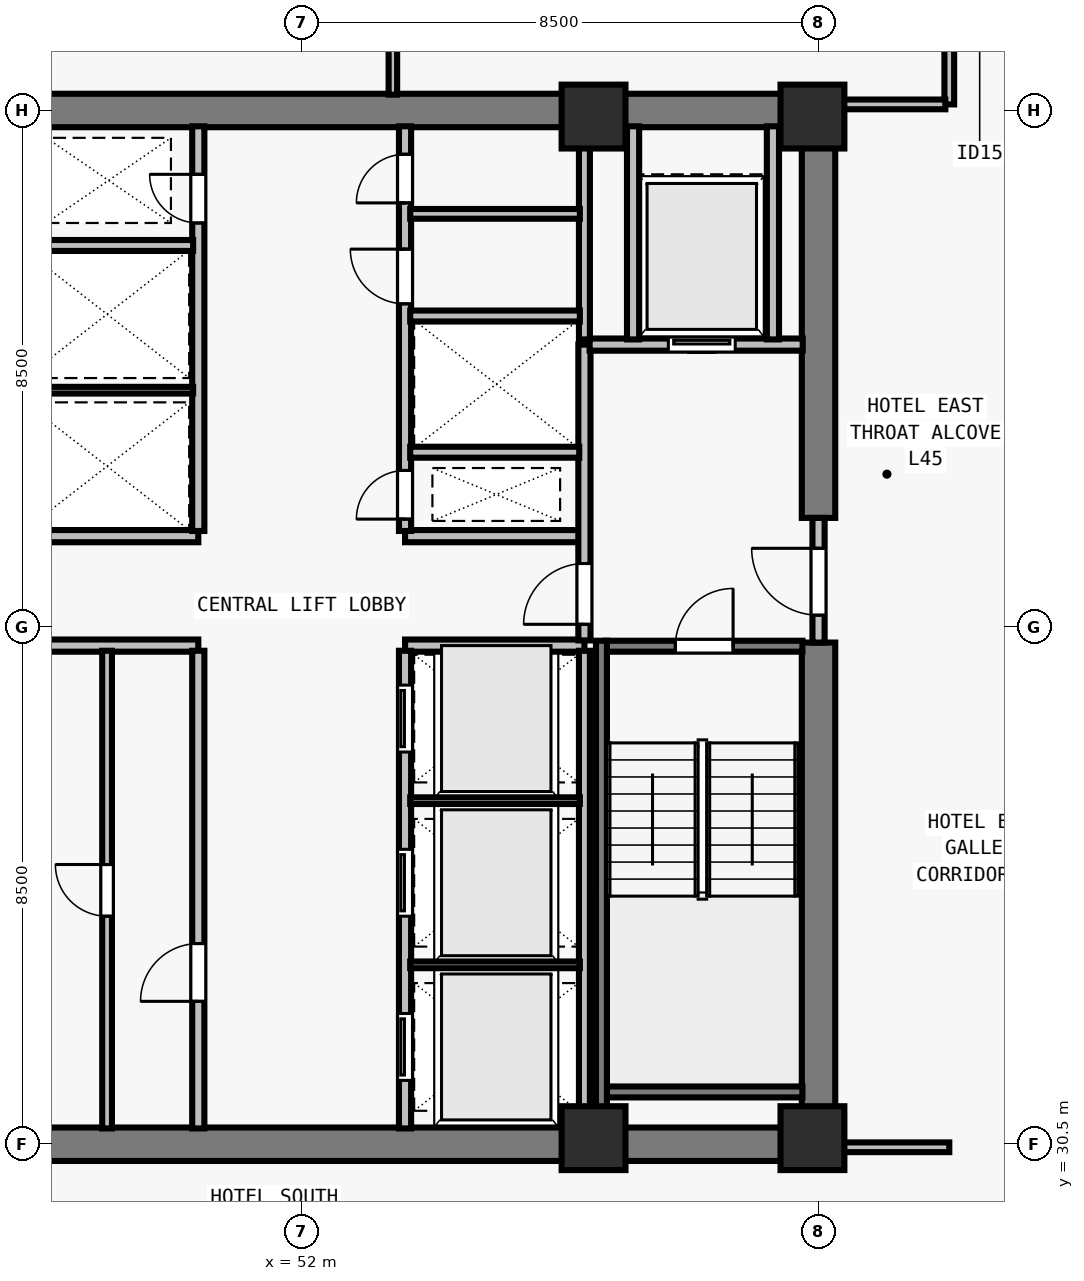
"""IFC4 building model, lengths in metres.
Left out: names, types, materials, properties, quantities, classifications, styles, units other than length and angle.
Written with IfcOpenShell. Run it as: python <this file> out.ifc"""

import sys

from ifc_helpers import new_model, si_unit, direction, frame, frame_2d, origin, origin_2d, place, context, subcontext, project, spatial, rectangle, extrude, element, fill, save


model = new_model("IFC4")
c1 = context("Model", 3, precision=1e-05, world=origin(), true_north=direction((0.0, 1.0)))
c2 = subcontext(c1, "Body", "Model", "MODEL_VIEW")
j1 = project(units=[si_unit("LENGTHUNIT", "METRE"), si_unit("PLANEANGLEUNIT", "RADIAN")], contexts=[c1])
p1 = place(None, origin())
s1 = spatial("IfcSite", under=j1, at=p1, CompositionType="ELEMENT")
p2 = place(p1, origin())
s2 = spatial("IfcBuilding", under=s1, at=p2, CompositionType="ELEMENT")
p3 = place(p2, frame((0.0, 0.0, 165.5)))
s3 = spatial("IfcBuildingStorey", under=s2, at=p3, CompositionType="ELEMENT", Elevation=165.5)
for number, where, z_axis, x_axis in (
    (1, (56.8, 30.6, 0.0), (0.0, 0.0, 1.0), (1.0, 0.0, 0.0)),
    (2, (60.4, 30.6, 0.0), (0.0, 0.0, 1.0), (1.0, 0.0, 0.0)),
    (3, (56.8, 47.4, 0.0), (0.0, 0.0, 1.0), (1.0, 0.0, 0.0)),
    (4, (60.4, 47.4, 0.0), (0.0, 0.0, 1.0), (1.0, 0.0, 0.0)),
):
    element("IfcColumn", number, at=place(p3, frame(where, z_axis=z_axis, x_axis=x_axis)), inside=s3, PredefinedType="COLUMN", context=c2, shape_type="SweptSolid", body=[
        extrude(rectangle(XDim=1.05, YDim=1.05, at=origin_2d()), origin(), (0.0, 0.0, 1.0), 3.5),
    ])
for number, where, z_axis, x_axis in (
    (5, (43.225, 30.5, 0.0), (0.0, 0.0, 1.0), (1.0, 0.0, 0.0)),
    (6, (43.225, 47.5, 0.0), (0.0, 0.0, 1.0), (1.0, 0.0, 0.0)),
):
    element("IfcWall", number, at=place(p3, frame(where, z_axis=z_axis, x_axis=x_axis)), inside=s3, PredefinedType="SHEAR", context=c2, shape_type="SweptSolid", body=[
        extrude(rectangle(XDim=17.55, YDim=0.55, at=frame_2d((8.775, 0.0))), origin(), (0.0, 0.0, 1.0), 3.28),
    ])
p4 = place(p3, frame((60.5, 30.765, 0.0), z_axis=(0.0, 0.0, 1.0), x_axis=(0.0, 1.0, 0.0)))
e7 = element("IfcWall", 7, at=p4, inside=s3, PredefinedType="SHEAR", context=c2, shape_type="SweptSolid", body=[
    extrude(rectangle(XDim=7.985, YDim=0.55, at=frame_2d((3.993, 0.0))), origin(), (0.0, 0.0, 1.0), 3.28),
])
p5 = place(p3, frame((60.5, 40.8, 0.0), z_axis=(0.0, 0.0, 1.0), x_axis=(0.0, 1.0, 0.0)))
e8 = element("IfcWall", 8, at=p5, inside=s3, PredefinedType="SHEAR", context=c2, shape_type="SweptSolid", body=[
    extrude(rectangle(XDim=6.435, YDim=0.55, at=frame_2d((3.218, 0.0))), origin(), (0.0, 0.0, 1.0), 3.28),
])
for number, where, z_axis, x_axis in (
    (9, (47.35, 38.7, 0.0), (0.0, 0.0, 1.0), (1.0, 0.0, 0.0)),
    (10, (47.35, 40.5, 0.0), (0.0, 0.0, 1.0), (1.0, 0.0, 0.0)),
    (11, (53.7, 38.7, 0.0), (0.0, 0.0, 1.0), (1.0, 0.0, 0.0)),
    (12, (53.7, 40.5, 0.0), (0.0, 0.0, 1.0), (1.0, 0.0, 0.0)),
):
    element("IfcWall", number, at=place(p3, frame(where, z_axis=z_axis, x_axis=x_axis)), inside=s3, PredefinedType="SOLIDWALL", context=c2, shape_type="SweptSolid", body=[
        extrude(rectangle(XDim=2.95, YDim=0.2, at=frame_2d((1.475, 0.0))), origin(), (0.0, 0.0, 1.0), 3.28),
    ])
p6 = place(p3, frame((50.3, 30.76, 0.0), z_axis=(0.0, 0.0, 1.0), x_axis=(0.0, 1.0, 0.0)))
e13 = element("IfcWall", 13, at=p6, inside=s3, PredefinedType="SOLIDWALL", context=c2, shape_type="SweptSolid", body=[
    extrude(rectangle(XDim=7.855, YDim=0.2, at=frame_2d((3.927, 0.0))), origin(), (0.0, 0.0, 1.0), 3.28),
])
p7 = place(p6, frame((2.09, 0.0, 0.0)))
e14 = element("IfcOpeningElement", 14, at=p7, cuts=e13, PredefinedType="OPENING", context=c2, shape_type="SweptSolid", body=[
    extrude(rectangle(XDim=0.95, YDim=2.12, at=frame_2d((0.475, 1.06))), frame((0.0, 0.11, 0.0), z_axis=(0.0, -1.0, 0.0), x_axis=(1.0, 0.0, 0.0)), (0.0, 0.0, 1.0), 0.22),
])
p8 = place(p3, frame((53.7, 30.76, 0.0), z_axis=(0.0, 0.0, 1.0), x_axis=(0.0, 1.0, 0.0)))
e15 = element("IfcWall", 15, at=p8, inside=s3, PredefinedType="SOLIDWALL", context=c2, shape_type="SweptSolid", body=[
    extrude(rectangle(XDim=7.855, YDim=0.2, at=frame_2d((3.927, 0.0))), origin(), (0.0, 0.0, 1.0), 3.28),
])
p9 = place(p8, frame((0.79, 0.0, 0.0)))
e16 = element("IfcOpeningElement", 16, at=p9, cuts=e15, PredefinedType="OPENING", context=c2, shape_type="SweptSolid", body=[
    extrude(rectangle(XDim=1.1, YDim=2.2, at=frame_2d((0.55, 1.1))), frame((0.0, 0.11, 0.0), z_axis=(0.0, -1.0, 0.0), x_axis=(1.0, 0.0, 0.0)), (0.0, 0.0, 1.0), 0.22),
])
p10 = place(p8, frame((3.49, 0.0, 0.0)))
e17 = element("IfcOpeningElement", 17, at=p10, cuts=e15, PredefinedType="OPENING", context=c2, shape_type="SweptSolid", body=[
    extrude(rectangle(XDim=1.1, YDim=2.2, at=frame_2d((0.55, 1.1))), frame((0.0, 0.11, 0.0), z_axis=(0.0, -1.0, 0.0), x_axis=(1.0, 0.0, 0.0)), (0.0, 0.0, 1.0), 0.22),
])
p11 = place(p8, frame((6.19, 0.0, 0.0)))
e18 = element("IfcOpeningElement", 18, at=p11, cuts=e15, PredefinedType="OPENING", context=c2, shape_type="SweptSolid", body=[
    extrude(rectangle(XDim=1.1, YDim=2.2, at=frame_2d((0.55, 1.1))), frame((0.0, 0.11, 0.0), z_axis=(0.0, -1.0, 0.0), x_axis=(1.0, 0.0, 0.0)), (0.0, 0.0, 1.0), 0.22),
])
p12 = place(p3, frame((50.3, 40.585, 0.0), z_axis=(0.0, 0.0, 1.0), x_axis=(0.0, 1.0, 0.0)))
e19 = element("IfcWall", 19, at=p12, inside=s3, PredefinedType="SOLIDWALL", context=c2, shape_type="SweptSolid", body=[
    extrude(rectangle(XDim=6.655, YDim=0.2, at=frame_2d((3.328, 0.0))), origin(), (0.0, 0.0, 1.0), 3.28),
])
p13 = place(p12, frame((5.065, 0.0, 0.0)))
e20 = element("IfcOpeningElement", 20, at=p13, cuts=e19, PredefinedType="OPENING", context=c2, shape_type="SweptSolid", body=[
    extrude(rectangle(XDim=0.8, YDim=2.08, at=frame_2d((0.4, 1.04))), frame((0.0, 0.11, 0.0), z_axis=(0.0, -1.0, 0.0), x_axis=(1.0, 0.0, 0.0)), (0.0, 0.0, 1.0), 0.22),
])
p14 = place(p3, frame((53.7, 40.585, 0.0), z_axis=(0.0, 0.0, 1.0), x_axis=(0.0, 1.0, 0.0)))
e21 = element("IfcWall", 21, at=p14, inside=s3, PredefinedType="SOLIDWALL", context=c2, shape_type="SweptSolid", body=[
    extrude(rectangle(XDim=6.655, YDim=0.2, at=frame_2d((3.328, 0.0))), origin(), (0.0, 0.0, 1.0), 3.28),
])
p15 = place(p14, frame((0.195, 0.0, 0.0)))
e22 = element("IfcOpeningElement", 22, at=p15, cuts=e21, PredefinedType="OPENING", context=c2, shape_type="SweptSolid", body=[
    extrude(rectangle(XDim=0.8, YDim=2.08, at=frame_2d((0.4, 1.04))), frame((0.0, 0.11, 0.0), z_axis=(0.0, -1.0, 0.0), x_axis=(1.0, 0.0, 0.0)), (0.0, 0.0, 1.0), 0.22),
])
p16 = place(p14, frame((3.735, 0.0, 0.0)))
e23 = element("IfcOpeningElement", 23, at=p16, cuts=e21, PredefinedType="OPENING", context=c2, shape_type="SweptSolid", body=[
    extrude(rectangle(XDim=0.9, YDim=2.12, at=frame_2d((0.45, 1.06))), frame((0.0, 0.11, 0.0), z_axis=(0.0, -1.0, 0.0), x_axis=(1.0, 0.0, 0.0)), (0.0, 0.0, 1.0), 0.22),
])
p17 = place(p14, frame((5.395, 0.0, 0.0)))
e24 = element("IfcOpeningElement", 24, at=p17, cuts=e21, PredefinedType="OPENING", context=c2, shape_type="SweptSolid", body=[
    extrude(rectangle(XDim=0.8, YDim=2.1, at=frame_2d((0.4, 1.05))), frame((0.0, 0.11, 0.0), z_axis=(0.0, -1.0, 0.0), x_axis=(1.0, 0.0, 0.0)), (0.0, 0.0, 1.0), 0.22),
])
p18 = place(p3, frame((60.5, 38.75, 0.0), z_axis=(0.0, 0.0, 1.0), x_axis=(0.0, 1.0, 0.0)))
e25 = element("IfcWall", 25, at=p18, inside=s3, PredefinedType="SOLIDWALL", context=c2, shape_type="SweptSolid", body=[
    extrude(rectangle(XDim=2.05, YDim=0.2, at=frame_2d((1.025, 0.0))), origin(), (0.0, 0.0, 1.0), 3.28),
])
p19 = place(p18, frame((0.45, 0.0, 0.0)))
e26 = element("IfcOpeningElement", 26, at=p19, cuts=e25, PredefinedType="OPENING", context=c2, shape_type="SweptSolid", body=[
    extrude(rectangle(XDim=1.1, YDim=2.15, at=frame_2d((0.55, 1.075))), frame((0.0, 0.11, 0.0), z_axis=(0.0, -1.0, 0.0), x_axis=(1.0, 0.0, 0.0)), (0.0, 0.0, 1.0), 0.22),
])
p20 = place(p3, frame((56.65, 38.785, 0.0), z_axis=(0.0, 0.0, 1.0), x_axis=(0.0, 1.0, 0.0)))
e27 = element("IfcWall", 27, at=p20, inside=s3, PredefinedType="SOLIDWALL", context=c2, shape_type="SweptSolid", body=[
    extrude(rectangle(XDim=4.865, YDim=0.2, at=frame_2d((2.433, 0.0))), origin(), (0.0, 0.0, 1.0), 3.28),
])
p21 = place(p20, frame((0.265, 0.0, 0.0)))
e28 = element("IfcOpeningElement", 28, at=p21, cuts=e27, PredefinedType="OPENING", context=c2, shape_type="SweptSolid", body=[
    extrude(rectangle(XDim=1.0, YDim=2.15, at=frame_2d((0.5, 1.075))), frame((0.0, 0.11, 0.0), z_axis=(0.0, -1.0, 0.0), x_axis=(1.0, 0.0, 0.0)), (0.0, 0.0, 1.0), 0.22),
])
p22 = place(p3, frame((56.735, 43.65, 0.0), z_axis=(0.0, 0.0, 1.0), x_axis=(1.0, 0.0, 0.0)))
e29 = element("IfcWall", 29, at=p22, inside=s3, PredefinedType="SOLIDWALL", context=c2, shape_type="SweptSolid", body=[
    extrude(rectangle(XDim=3.505, YDim=0.2, at=frame_2d((1.752, 0.0))), origin(), (0.0, 0.0, 1.0), 3.28),
])
p23 = place(p22, frame((1.295, 0.0, 0.0)))
e30 = element("IfcOpeningElement", 30, at=p23, cuts=e29, PredefinedType="OPENING", context=c2, shape_type="SweptSolid", body=[
    extrude(rectangle(XDim=1.1, YDim=2.2, at=frame_2d((0.55, 1.1))), frame((0.0, 0.11, 0.0), z_axis=(0.0, -1.0, 0.0), x_axis=(1.0, 0.0, 0.0)), (0.0, 0.0, 1.0), 0.22),
])
for number, where, z_axis, x_axis in (
    (31, (57.45, 43.735, 0.0), (0.0, 0.0, 1.0), (0.0, 1.0, 0.0)),
    (32, (59.75, 43.735, 0.0), (0.0, 0.0, 1.0), (0.0, 1.0, 0.0)),
):
    element("IfcWall", number, at=place(p3, frame(where, z_axis=z_axis, x_axis=x_axis)), inside=s3, PredefinedType="SOLIDWALL", context=c2, shape_type="SweptSolid", body=[
        extrude(rectangle(XDim=3.505, YDim=0.2, at=frame_2d((1.752, 0.0))), origin(), (0.0, 0.0, 1.0), 3.28),
    ])
p24 = place(p3, frame((48.8, 30.76, 0.0), z_axis=(0.0, 0.0, 1.0), x_axis=(0.0, 1.0, 0.0)))
e33 = element("IfcWall", 33, at=p24, inside=s3, PredefinedType="PARTITIONING", context=c2, shape_type="SweptSolid", body=[
    extrude(rectangle(XDim=7.855, YDim=0.16, at=frame_2d((3.927, 0.0))), origin(), (0.0, 0.0, 1.0), 3.28),
])
p25 = place(p24, frame((3.49, 0.0, 0.0)))
e34 = element("IfcOpeningElement", 34, at=p25, cuts=e33, PredefinedType="OPENING", context=c2, shape_type="SweptSolid", body=[
    extrude(rectangle(XDim=0.85, YDim=2.12, at=frame_2d((0.425, 1.06))), frame((0.0, 0.09, 0.0), z_axis=(0.0, -1.0, 0.0), x_axis=(1.0, 0.0, 0.0)), (0.0, 0.0, 1.0), 0.18),
])
p26 = place(p3, frame((56.65, 30.76, 0.0), z_axis=(0.0, 0.0, 1.0), x_axis=(0.0, 1.0, 0.0)))
e35 = element("IfcWall", 35, at=p26, inside=s3, PredefinedType="SOLIDWALL", context=c2, shape_type="SweptSolid", body=[
    extrude(rectangle(XDim=7.855, YDim=0.18, at=frame_2d((3.927, 0.0))), origin(), (0.0, 0.0, 1.0), 3.28),
])
for number, where, z_axis, x_axis in (
    (36, (53.785, 33.45, 0.0), (0.0, 0.0, 1.0), (1.0, 0.0, 0.0)),
    (37, (53.785, 36.15, 0.0), (0.0, 0.0, 1.0), (1.0, 0.0, 0.0)),
):
    element("IfcWall", number, at=place(p3, frame(where, z_axis=z_axis, x_axis=x_axis)), inside=s3, PredefinedType="PARTITIONING", context=c2, shape_type="SweptSolid", body=[
        extrude(rectangle(XDim=2.79, YDim=0.11, at=frame_2d((1.395, 0.0))), origin(), (0.0, 0.0, 1.0), 3.28),
    ])
p27 = place(p3, frame((47.435, 42.9, 0.0), z_axis=(0.0, 0.0, 1.0), x_axis=(1.0, 0.0, 0.0)))
e38 = element("IfcWall", 38, at=p27, inside=s3, PredefinedType="PARTITIONING", context=c2, shape_type="SweptSolid", body=[
    extrude(rectangle(XDim=2.78, YDim=0.11, at=frame_2d((1.39, 0.0))), origin(), (0.0, 0.0, 1.0), 3.28),
])
p28 = place(p3, frame((47.425, 45.28, 0.0), z_axis=(0.0, 0.0, 1.0), x_axis=(1.0, 0.0, 0.0)))
e39 = element("IfcWall", 39, at=p28, inside=s3, PredefinedType="SOLIDWALL", context=c2, shape_type="SweptSolid", body=[
    extrude(rectangle(XDim=2.79, YDim=0.18, at=frame_2d((1.395, 0.0))), origin(), (0.0, 0.0, 1.0), 3.28),
])
p29 = place(p3, frame((56.65, 43.735, 0.0), z_axis=(0.0, 0.0, 1.0), x_axis=(0.0, 1.0, 0.0)))
e40 = element("IfcWall", 40, at=p29, inside=s3, PredefinedType="SOLIDWALL", context=c2, shape_type="SweptSolid", body=[
    extrude(rectangle(XDim=3.505, YDim=0.18, at=frame_2d((1.752, 0.0))), origin(), (0.0, 0.0, 1.0), 3.28),
])
p30 = place(p3, frame((53.785, 41.88, 0.0), z_axis=(0.0, 0.0, 1.0), x_axis=(1.0, 0.0, 0.0)))
e41 = element("IfcWall", 41, at=p30, inside=s3, PredefinedType="SOLIDWALL", context=c2, shape_type="SweptSolid", body=[
    extrude(rectangle(XDim=2.78, YDim=0.18, at=frame_2d((1.39, 0.0))), origin(), (0.0, 0.0, 1.0), 3.28),
])
p31 = place(p3, frame((53.785, 44.12, 0.0), z_axis=(0.0, 0.0, 1.0), x_axis=(1.0, 0.0, 0.0)))
e42 = element("IfcWall", 42, at=p31, inside=s3, PredefinedType="SOLIDWALL", context=c2, shape_type="SweptSolid", body=[
    extrude(rectangle(XDim=2.79, YDim=0.18, at=frame_2d((1.395, 0.0))), origin(), (0.0, 0.0, 1.0), 3.28),
])
p32 = place(p3, frame((53.785, 45.8, 0.0), z_axis=(0.0, 0.0, 1.0), x_axis=(1.0, 0.0, 0.0)))
e43 = element("IfcWall", 43, at=p32, inside=s3, PredefinedType="PARTITIONING", context=c2, shape_type="SweptSolid", body=[
    extrude(rectangle(XDim=2.79, YDim=0.16, at=frame_2d((1.395, 0.0))), origin(), (0.0, 0.0, 1.0), 3.28),
])
p33 = place(p3, frame((62.65, 47.6, 0.0), z_axis=(0.0, 0.0, 1.0), x_axis=(0.0, 1.0, 0.0)))
e44 = element("IfcWall", 44, at=p33, inside=s3, PredefinedType="PARTITIONING", context=c2, shape_type="SweptSolid", body=[
    extrude(rectangle(XDim=15.075, YDim=0.16, at=frame_2d((7.538, 0.0))), origin(), (0.0, 0.0, 1.0), 2.555),
])
p34 = place(p33, frame((1.6, 0.0, 0.0)))
e45 = element("IfcOpeningElement", 45, at=p34, cuts=e44, PredefinedType="OPENING", context=c2, shape_type="SweptSolid", body=[
    extrude(rectangle(XDim=0.92, YDim=2.12, at=frame_2d((0.46, 1.06))), frame((0.0, 0.09, 0.0), z_axis=(0.0, -1.0, 0.0), x_axis=(1.0, 0.0, 0.0)), (0.0, 0.0, 1.0), 0.18),
])
p35 = place(p33, frame((6.2, 0.0, 0.0)))
e46 = element("IfcOpeningElement", 46, at=p35, cuts=e44, PredefinedType="OPENING", context=c2, shape_type="SweptSolid", body=[
    extrude(rectangle(XDim=0.96, YDim=2.12, at=frame_2d((0.48, 1.06))), frame((0.0, 0.09, 0.0), z_axis=(0.0, -1.0, 0.0), x_axis=(1.0, 0.0, 0.0)), (0.0, 0.0, 1.0), 0.18),
])
p36 = place(p3, frame((60.765, 30.45, 0.0), z_axis=(0.0, 0.0, 1.0), x_axis=(1.0, 0.0, 0.0)))
e47 = element("IfcWall", 47, at=p36, inside=s3, PredefinedType="PARTITIONING", context=c2, shape_type="SweptSolid", body=[
    extrude(rectangle(XDim=1.885, YDim=0.16, at=frame_2d((0.942, 0.0))), origin(), (0.0, 0.0, 1.0), 3.28),
])
p37 = place(p3, frame((60.765, 47.6, 0.0), z_axis=(0.0, 0.0, 1.0), x_axis=(1.0, 0.0, 0.0)))
e48 = element("IfcWall", 48, at=p37, inside=s3, PredefinedType="PARTITIONING", context=c2, shape_type="SweptSolid", body=[
    extrude(rectangle(XDim=1.82, YDim=0.16, at=frame_2d((0.91, 0.0))), origin(), (0.0, 0.0, 1.0), 3.28),
])
p38 = place(p3, frame((53.5, 47.76, 0.0), z_axis=(0.0, 0.0, 1.0), x_axis=(0.0, 1.0, 0.0)))
e49 = element("IfcWall", 49, at=p38, inside=s3, PredefinedType="PARTITIONING", context=c2, shape_type="SweptSolid", body=[
    extrude(rectangle(XDim=14.915, YDim=0.14, at=frame_2d((7.458, 0.0))), origin(), (0.0, 0.0, 1.0), 2.896),
])
p39 = place(p3, frame((57.005, 38.69, 0.0), z_axis=(0.0, 0.0, 1.0), x_axis=(1.0, 0.0, 0.0)))
e50 = element("IfcWall", 50, at=p39, inside=s3, PredefinedType="SOLIDWALL", context=c2, shape_type="SweptSolid", body=[
    extrude(rectangle(XDim=3.23, YDim=0.18, at=frame_2d((1.615, 0.0))), origin(), (0.0, 0.0, 1.0), 3.28),
])
p40 = place(p39, frame((1.14, 0.0, 0.0)))
e51 = element("IfcOpeningElement", 51, at=p40, cuts=e50, PredefinedType="OPENING", context=c2, shape_type="SweptSolid", body=[
    extrude(rectangle(XDim=0.95, YDim=2.15, at=frame_2d((0.475, 1.075))), frame((0.0, 0.1, 0.0), z_axis=(0.0, -1.0, 0.0), x_axis=(1.0, 0.0, 0.0)), (0.0, 0.0, 1.0), 0.2),
])
p41 = place(p3, frame((57.005, 31.36, 0.0), z_axis=(0.0, 0.0, 1.0), x_axis=(1.0, 0.0, 0.0)))
e52 = element("IfcWall", 52, at=p41, inside=s3, PredefinedType="SOLIDWALL", context=c2, shape_type="SweptSolid", body=[
    extrude(rectangle(XDim=3.23, YDim=0.18, at=frame_2d((1.615, 0.0))), origin(), (0.0, 0.0, 1.0), 3.28),
])
p42 = place(p3, frame((56.93, 38.78, 0.0), z_axis=(0.0, 0.0, 1.0), x_axis=(0.0, -1.0, 0.0)))
e53 = element("IfcWall", 53, at=p42, inside=s3, PredefinedType="SOLIDWALL", context=c2, shape_type="SweptSolid", body=[
    extrude(rectangle(XDim=8.017, YDim=0.18, at=frame_2d((4.009, 0.0))), origin(), (0.0, 0.0, 1.0), 3.28),
])
p43 = place(p19, origin())
e54 = element("IfcDoor", 54, at=p43, inside=s3, OperationType="SINGLE_SWING_RIGHT", PredefinedType="DOOR", context=c2, shape_type="SweptSolid", body=[
    extrude(rectangle(XDim=1.1, YDim=2.15, at=frame_2d((0.55, 1.075))), frame((0.0, 0.025, 0.0), z_axis=(0.0, -1.0, 0.0), x_axis=(1.0, 0.0, 0.0)), (0.0, 0.0, 1.0), 0.05),
])
fill(e26, e54)
p44 = place(p21, origin())
e55 = element("IfcDoor", 55, at=p44, inside=s3, OperationType="SINGLE_SWING_LEFT", PredefinedType="DOOR", context=c2, shape_type="SweptSolid", body=[
    extrude(rectangle(XDim=1.0, YDim=2.15, at=frame_2d((0.5, 1.075))), frame((0.0, 0.025, 0.0), z_axis=(0.0, -1.0, 0.0), x_axis=(1.0, 0.0, 0.0)), (0.0, 0.0, 1.0), 0.05),
])
fill(e28, e55)
p45 = place(p23, origin())
e56 = element("IfcDoor", 56, at=p45, inside=s3, OperationType="SLIDING_TO_LEFT", PredefinedType="DOOR", context=c2, shape_type="SweptSolid", body=[
    extrude(rectangle(XDim=1.1, YDim=2.2, at=frame_2d((0.55, 1.1))), frame((0.0, 0.025, 0.0), z_axis=(0.0, -1.0, 0.0), x_axis=(1.0, 0.0, 0.0)), (0.0, 0.0, 1.0), 0.05),
])
fill(e30, e56)
p46 = place(p7, origin())
e57 = element("IfcDoor", 57, at=p46, inside=s3, OperationType="SINGLE_SWING_LEFT", PredefinedType="DOOR", context=c2, shape_type="SweptSolid", body=[
    extrude(rectangle(XDim=0.95, YDim=2.12, at=frame_2d((0.475, 1.06))), frame((0.0, 0.025, 0.0), z_axis=(0.0, -1.0, 0.0), x_axis=(1.0, 0.0, 0.0)), (0.0, 0.0, 1.0), 0.05),
])
fill(e14, e57)
p47 = place(p25, origin())
e58 = element("IfcDoor", 58, at=p47, inside=s3, OperationType="SINGLE_SWING_RIGHT", PredefinedType="DOOR", context=c2, shape_type="SweptSolid", body=[
    extrude(rectangle(XDim=0.85, YDim=2.12, at=frame_2d((0.425, 1.06))), frame((0.0, 0.025, 0.0), z_axis=(0.0, -1.0, 0.0), x_axis=(1.0, 0.0, 0.0)), (0.0, 0.0, 1.0), 0.05),
])
fill(e34, e58)
p48 = place(p9, origin())
e59 = element("IfcDoor", 59, at=p48, inside=s3, OperationType="SLIDING_TO_LEFT", PredefinedType="DOOR", context=c2, shape_type="SweptSolid", body=[
    extrude(rectangle(XDim=1.1, YDim=2.2, at=frame_2d((0.55, 1.1))), frame((0.0, 0.025, 0.0), z_axis=(0.0, -1.0, 0.0), x_axis=(1.0, 0.0, 0.0)), (0.0, 0.0, 1.0), 0.05),
])
fill(e16, e59)
p49 = place(p10, origin())
e60 = element("IfcDoor", 60, at=p49, inside=s3, OperationType="SLIDING_TO_LEFT", PredefinedType="DOOR", context=c2, shape_type="SweptSolid", body=[
    extrude(rectangle(XDim=1.1, YDim=2.2, at=frame_2d((0.55, 1.1))), frame((0.0, 0.025, 0.0), z_axis=(0.0, -1.0, 0.0), x_axis=(1.0, 0.0, 0.0)), (0.0, 0.0, 1.0), 0.05),
])
fill(e17, e60)
p50 = place(p11, origin())
e61 = element("IfcDoor", 61, at=p50, inside=s3, OperationType="SLIDING_TO_LEFT", PredefinedType="DOOR", context=c2, shape_type="SweptSolid", body=[
    extrude(rectangle(XDim=1.1, YDim=2.2, at=frame_2d((0.55, 1.1))), frame((0.0, 0.025, 0.0), z_axis=(0.0, -1.0, 0.0), x_axis=(1.0, 0.0, 0.0)), (0.0, 0.0, 1.0), 0.05),
])
fill(e18, e61)
p51 = place(p13, origin())
e62 = element("IfcDoor", 62, at=p51, inside=s3, OperationType="SINGLE_SWING_RIGHT", PredefinedType="DOOR", context=c2, shape_type="SweptSolid", body=[
    extrude(rectangle(XDim=0.8, YDim=2.08, at=frame_2d((0.4, 1.04))), frame((0.0, 0.025, 0.0), z_axis=(0.0, -1.0, 0.0), x_axis=(1.0, 0.0, 0.0)), (0.0, 0.0, 1.0), 0.05),
])
fill(e20, e62)
p52 = place(p15, origin())
e63 = element("IfcDoor", 63, at=p52, inside=s3, OperationType="SINGLE_SWING_LEFT", PredefinedType="DOOR", context=c2, shape_type="SweptSolid", body=[
    extrude(rectangle(XDim=0.8, YDim=2.08, at=frame_2d((0.4, 1.04))), frame((0.0, 0.025, 0.0), z_axis=(0.0, -1.0, 0.0), x_axis=(1.0, 0.0, 0.0)), (0.0, 0.0, 1.0), 0.05),
])
fill(e22, e63)
p53 = place(p16, origin())
e64 = element("IfcDoor", 64, at=p53, inside=s3, OperationType="SINGLE_SWING_RIGHT", PredefinedType="DOOR", context=c2, shape_type="SweptSolid", body=[
    extrude(rectangle(XDim=0.9, YDim=2.12, at=frame_2d((0.45, 1.06))), frame((0.0, 0.025, 0.0), z_axis=(0.0, -1.0, 0.0), x_axis=(1.0, 0.0, 0.0)), (0.0, 0.0, 1.0), 0.05),
])
fill(e23, e64)
p54 = place(p17, origin())
e65 = element("IfcDoor", 65, at=p54, inside=s3, OperationType="SINGLE_SWING_LEFT", PredefinedType="DOOR", context=c2, shape_type="SweptSolid", body=[
    extrude(rectangle(XDim=0.8, YDim=2.1, at=frame_2d((0.4, 1.05))), frame((0.0, 0.025, 0.0), z_axis=(0.0, -1.0, 0.0), x_axis=(1.0, 0.0, 0.0)), (0.0, 0.0, 1.0), 0.05),
])
fill(e24, e65)
p55 = place(p40, origin())
e66 = element("IfcDoor", 66, at=p55, inside=s3, OperationType="SINGLE_SWING_RIGHT", PredefinedType="DOOR", context=c2, shape_type="SweptSolid", body=[
    extrude(rectangle(XDim=0.95, YDim=2.15, at=frame_2d((0.475, 1.075))), frame((0.0, 0.025, 0.0), z_axis=(0.0, -1.0, 0.0), x_axis=(1.0, 0.0, 0.0)), (0.0, 0.0, 1.0), 0.05),
])
fill(e51, e66)
save(model, sys.argv[1])
